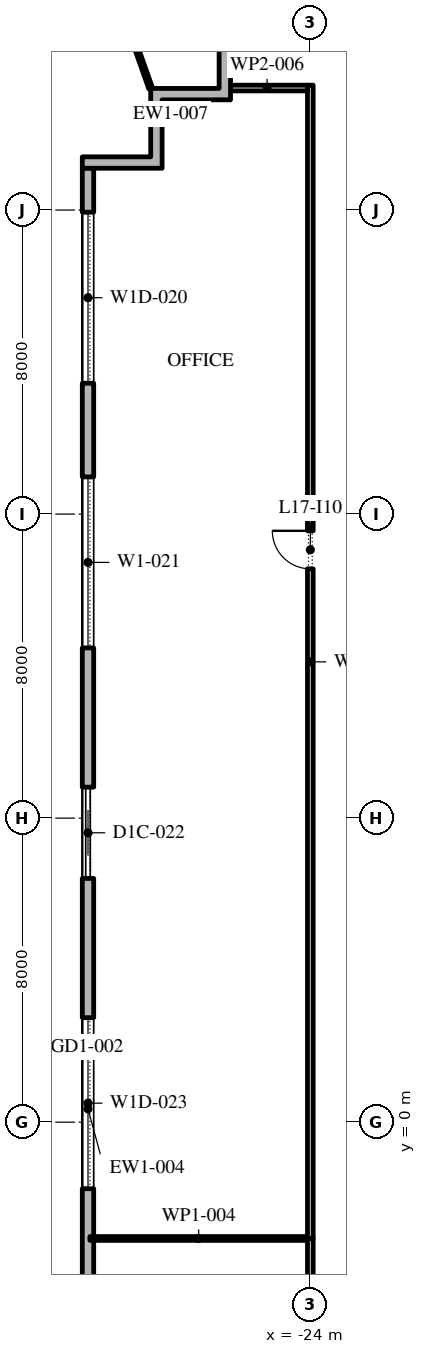
"""IFC4 building model, lengths in metres.
Left out: names, types, materials, properties, quantities, classifications, styles, units other than length and angle.
Written with IfcOpenShell. Run it as: python <this file> out.ifc"""

import sys

from ifc_helpers import new_model, si_unit, direction, frame, frame_2d, origin, place, context, subcontext, project, spatial, polyline, rectangle, outline, extrude, element, fill, save


model = new_model("IFC4")
c1 = context("Model", 3, precision=1e-05, world=origin(), true_north=direction((0.0, 1.0)))
c2 = subcontext(c1, "Body", "Model", "MODEL_VIEW")
j1 = project(units=[si_unit("LENGTHUNIT", "METRE"), si_unit("PLANEANGLEUNIT", "RADIAN")], contexts=[c1])
p1 = place(None, origin())
s1 = spatial("IfcSite", under=j1, at=p1, CompositionType="ELEMENT")
p2 = place(p1, origin())
s2 = spatial("IfcBuilding", under=s1, at=p2, CompositionType="ELEMENT")
p3 = place(p2, frame((0.0, 0.0, 81.6)))
s3 = spatial("IfcBuildingStorey", under=s2, at=p3, CompositionType="ELEMENT", Elevation=81.6)
p4 = place(p3, frame((-29.85, 25.1, 0.0), z_axis=(0.0, 0.0, 1.0), x_axis=(0.0, -1.0, 0.0)))
e1 = element("IfcWall", 1, at=p4, inside=s3, PredefinedType="STANDARD", context=c2, shape_type="SweptSolid", body=[
    extrude(rectangle(XDim=49.5, YDim=0.3, at=frame_2d((24.75, 0.0))), origin(), (0.0, 0.0, 1.0), 4.0),
])
p5 = place(p4, frame((1.157, 0.0, 0.45)))
e2 = element("IfcOpeningElement", 2, at=p5, cuts=e1, PredefinedType="OPENING", context=c2, shape_type="SweptSolid", body=[
    extrude(rectangle(XDim=4.5, YDim=2.875, at=frame_2d((2.25, 1.438))), frame((0.0, 0.16, 0.0), z_axis=(0.0, -1.0, 0.0), x_axis=(1.0, 0.0, 0.0)), (0.0, 0.0, 1.0), 0.32),
])
p6 = place(p4, frame((8.121, 0.0, 0.45)))
e3 = element("IfcOpeningElement", 3, at=p6, cuts=e1, PredefinedType="OPENING", context=c2, shape_type="SweptSolid", body=[
    extrude(rectangle(XDim=4.5, YDim=3.05, at=frame_2d((2.25, 1.525))), frame((0.0, 0.16, 0.0), z_axis=(0.0, -1.0, 0.0), x_axis=(1.0, 0.0, 0.0)), (0.0, 0.0, 1.0), 0.32),
])
p7 = place(p4, frame((16.286, 0.0, 0.0)))
e4 = element("IfcOpeningElement", 4, at=p7, cuts=e1, PredefinedType="OPENING", context=c2, shape_type="SweptSolid", body=[
    extrude(rectangle(XDim=2.4, YDim=3.325, at=frame_2d((1.2, 1.663))), frame((0.0, 0.16, 0.0), z_axis=(0.0, -1.0, 0.0), x_axis=(1.0, 0.0, 0.0)), (0.0, 0.0, 1.0), 0.32),
])
p8 = place(p4, frame((22.35, 0.0, 0.45)))
e5 = element("IfcOpeningElement", 5, at=p8, cuts=e1, PredefinedType="OPENING", context=c2, shape_type="SweptSolid", body=[
    extrude(rectangle(XDim=4.5, YDim=2.875, at=frame_2d((2.25, 1.438))), frame((0.0, 0.16, 0.0), z_axis=(0.0, -1.0, 0.0), x_axis=(1.0, 0.0, 0.0)), (0.0, 0.0, 1.0), 0.32),
])
p9 = place(p4, frame((29.464, 0.0, 0.45)))
e6 = element("IfcOpeningElement", 6, at=p9, cuts=e1, PredefinedType="OPENING", context=c2, shape_type="SweptSolid", body=[
    extrude(rectangle(XDim=4.5, YDim=2.875, at=frame_2d((2.25, 1.438))), frame((0.0, 0.16, 0.0), z_axis=(0.0, -1.0, 0.0), x_axis=(1.0, 0.0, 0.0)), (0.0, 0.0, 1.0), 0.32),
])
p10 = place(p4, frame((36.579, 0.0, 0.45)))
e7 = element("IfcOpeningElement", 7, at=p10, cuts=e1, PredefinedType="OPENING", context=c2, shape_type="SweptSolid", body=[
    extrude(rectangle(XDim=4.5, YDim=2.825, at=frame_2d((2.25, 1.413))), frame((0.0, 0.16, 0.0), z_axis=(0.0, -1.0, 0.0), x_axis=(1.0, 0.0, 0.0)), (0.0, 0.0, 1.0), 0.32),
])
p11 = place(p4, frame((44.743, 0.0, 0.0)))
e8 = element("IfcOpeningElement", 8, at=p11, cuts=e1, PredefinedType="OPENING", context=c2, shape_type="SweptSolid", body=[
    extrude(rectangle(XDim=2.4, YDim=3.5, at=frame_2d((1.2, 1.75))), frame((0.0, 0.16, 0.0), z_axis=(0.0, -1.0, 0.0), x_axis=(1.0, 0.0, 0.0)), (0.0, 0.0, 1.0), 0.32),
])
p12 = place(p3, origin())
e9 = element("IfcWall", 9, at=p12, inside=s3, PredefinedType="STANDARD", context=c2, shape_type="SweptSolid", body=[
    extrude(outline(polyline([(-28.2, 25.4), (-28.2, 27.2), (-26.4, 27.2), (-26.4, 28.7), (-26.1, 28.7), (-26.1, 26.9), (-27.9, 26.9), (-27.9, 25.1), (-30.0, 25.1), (-30.0, 25.4), (-28.2, 25.4)])), origin(), (0.0, 0.0, 1.0), 4.0),
])
p13 = place(p3, frame((-28.2, 27.2, -0.05), z_axis=(0.0, 0.0, 1.0), x_axis=(-0.334412113697, 0.942426940517, 0.0)))
e10 = element("IfcWall", 10, at=p13, inside=s3, PredefinedType="STANDARD", context=c2, shape_type="SweptSolid", body=[
    extrude(rectangle(XDim=6.167, YDim=0.1, at=frame_2d((3.083, 0.0))), origin(), (0.0, 0.0, 1.0), 4.05),
])
p14 = place(p3, frame((-24.0, -17.29, 0.0), z_axis=(0.0, 0.0, 1.0), x_axis=(0.0, 1.0, 0.0)))
e11 = element("IfcWall", 11, at=p14, inside=s3, PredefinedType="PARTITIONING", context=c2, shape_type="SweptSolid", body=[
    extrude(rectangle(XDim=14.23, YDim=0.15, at=frame_2d((7.115, 0.0))), origin(), (0.0, 0.0, 1.0), 4.0),
])
p15 = place(p14, frame((5.08, 0.0, 0.0)))
e12 = element("IfcOpeningElement", 12, at=p15, cuts=e11, PredefinedType="OPENING", context=c2, shape_type="SweptSolid", body=[
    extrude(rectangle(XDim=1.0, YDim=2.1, at=frame_2d((0.5, 1.05))), frame((0.0, 0.085, 0.0), z_axis=(0.0, -1.0, 0.0), x_axis=(1.0, 0.0, 0.0)), (0.0, 0.0, 1.0), 0.17),
])
p16 = place(p3, frame((-24.075, -3.06, 0.0), z_axis=(0.0, 0.0, 1.0), x_axis=(-1.0, 0.0, 0.0)))
e13 = element("IfcWall", 13, at=p16, inside=s3, PredefinedType="PARTITIONING", context=c2, shape_type="SweptSolid", body=[
    extrude(rectangle(XDim=5.725, YDim=0.1, at=frame_2d((2.863, 0.0))), origin(), (0.0, 0.0, 1.0), 4.0),
])
p17 = place(p3, frame((-24.0, -3.06, 0.0), z_axis=(0.0, 0.0, 1.0), x_axis=(0.0, 1.0, 0.0)))
e14 = element("IfcWall", 14, at=p17, inside=s3, PredefinedType="PARTITIONING", context=c2, shape_type="SweptSolid", body=[
    extrude(rectangle(XDim=30.345, YDim=0.15, at=frame_2d((15.172, 0.0))), origin(), (0.0, 0.0, 1.0), 4.0),
])
p18 = place(p17, frame((17.62, 0.0, 0.0)))
e15 = element("IfcOpeningElement", 15, at=p18, cuts=e14, PredefinedType="OPENING", context=c2, shape_type="SweptSolid", body=[
    extrude(rectangle(XDim=1.0, YDim=2.1, at=frame_2d((0.5, 1.05))), frame((0.0, 0.085, 0.0), z_axis=(0.0, -1.0, 0.0), x_axis=(1.0, 0.0, 0.0)), (0.0, 0.0, 1.0), 0.17),
])
p19 = place(p3, frame((-24.075, 27.21, 0.0), z_axis=(0.0, 0.0, 1.0), x_axis=(-1.0, 0.0, 0.0)))
e16 = element("IfcWall", 16, at=p19, inside=s3, PredefinedType="PARTITIONING", context=c2, shape_type="SweptSolid", body=[
    extrude(rectangle(XDim=2.125, YDim=0.15, at=frame_2d((1.062, 0.0))), origin(), (0.0, 0.0, 1.0), 4.0),
])
p20 = place(p5, origin())
e17 = element("IfcWindow", 17, at=p20, inside=s3, PartitioningType="DOUBLE_PANEL_VERTICAL", PredefinedType="WINDOW", context=c2, shape_type="SweptSolid", body=[
    extrude(rectangle(XDim=4.5, YDim=2.875, at=frame_2d((2.25, 1.438))), frame((0.0, 0.03, 0.0), z_axis=(0.0, -1.0, 0.0), x_axis=(1.0, 0.0, 0.0)), (0.0, 0.0, 1.0), 0.06),
])
fill(e2, e17)
p21 = place(p6, origin())
e18 = element("IfcWindow", 18, at=p21, inside=s3, PartitioningType="DOUBLE_PANEL_VERTICAL", PredefinedType="WINDOW", context=c2, shape_type="SweptSolid", body=[
    extrude(rectangle(XDim=4.5, YDim=3.05, at=frame_2d((2.25, 1.525))), frame((0.0, 0.03, 0.0), z_axis=(0.0, -1.0, 0.0), x_axis=(1.0, 0.0, 0.0)), (0.0, 0.0, 1.0), 0.06),
])
fill(e3, e18)
p22 = place(p7, origin())
e19 = element("IfcDoor", 19, at=p22, inside=s3, OperationType="DOUBLE_DOOR_SLIDING", PredefinedType="DOOR", context=c2, shape_type="SweptSolid", body=[
    extrude(rectangle(XDim=2.4, YDim=3.325, at=frame_2d((1.2, 1.663))), frame((0.0, 0.025, 0.0), z_axis=(0.0, -1.0, 0.0), x_axis=(1.0, 0.0, 0.0)), (0.0, 0.0, 1.0), 0.05),
])
fill(e4, e19)
p23 = place(p8, origin())
e20 = element("IfcWindow", 20, at=p23, inside=s3, PartitioningType="DOUBLE_PANEL_VERTICAL", PredefinedType="WINDOW", context=c2, shape_type="SweptSolid", body=[
    extrude(rectangle(XDim=4.5, YDim=2.875, at=frame_2d((2.25, 1.438))), frame((0.0, 0.03, 0.0), z_axis=(0.0, -1.0, 0.0), x_axis=(1.0, 0.0, 0.0)), (0.0, 0.0, 1.0), 0.06),
])
fill(e5, e20)
p24 = place(p18, origin())
e21 = element("IfcDoor", 21, at=p24, inside=s3, OperationType="SINGLE_SWING_LEFT", PredefinedType="DOOR", context=c2, shape_type="SweptSolid", body=[
    extrude(rectangle(XDim=1.0, YDim=2.1, at=frame_2d((0.5, 1.05))), frame((0.0, 0.025, 0.0), z_axis=(0.0, -1.0, 0.0), x_axis=(1.0, 0.0, 0.0)), (0.0, 0.0, 1.0), 0.05),
])
fill(e15, e21)
save(model, sys.argv[1])
